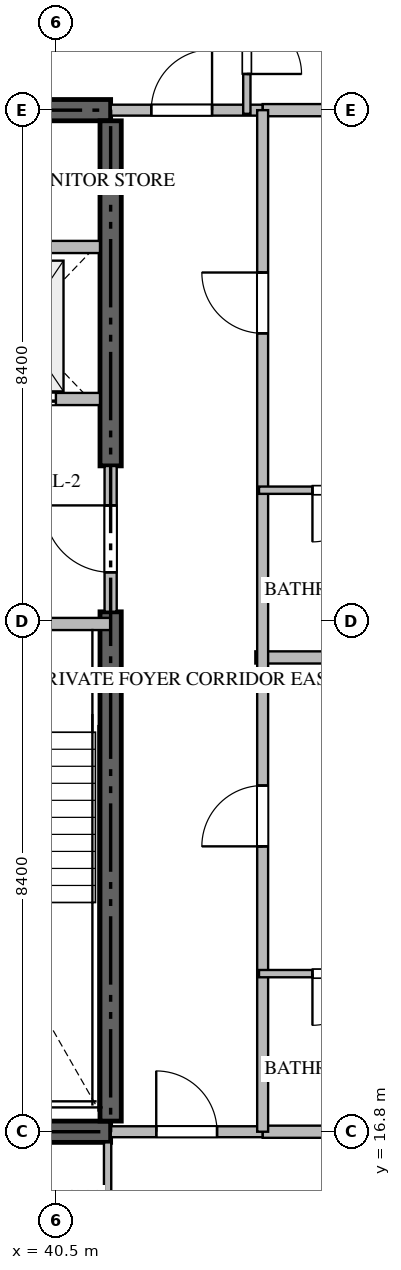
"""IFC4 building model, lengths in metres.
Left out: names, types, materials, properties, quantities, classifications, styles, units other than length and angle.
Written with IfcOpenShell. Run it as: python <this file> out.ifc"""

import sys

from ifc_helpers import new_model, si_unit, direction, frame, frame_2d, origin, place, context, subcontext, project, spatial, rectangle, extrude, source, transform, mapped, element, fill, save


model = new_model("IFC4")
c1 = context("Model", 3, precision=1e-05, world=origin(), true_north=direction((0.0, 1.0)))
c2 = subcontext(c1, "Body", "Model", "MODEL_VIEW")
j1 = project(units=[si_unit("LENGTHUNIT", "METRE"), si_unit("PLANEANGLEUNIT", "RADIAN")], contexts=[c1])
p1 = place(None, origin())
s1 = spatial("IfcSite", under=j1, at=p1, CompositionType="ELEMENT")
p2 = place(p1, origin())
s2 = spatial("IfcBuilding", under=s1, at=p2, CompositionType="ELEMENT")
p3 = place(p2, frame((0.0, 0.0, 237.4)))
s3 = spatial("IfcBuildingStorey", under=s2, at=p3, CompositionType="ELEMENT", Elevation=237.4)
for number, where, z_axis, x_axis in (
    (1, (23.4, 16.8, -0.26), (0.0, 0.0, 1.0), (1.0, 0.0, 0.0)),
    (2, (41.4, 33.6, -0.26), (0.0, 0.0, 1.0), (-1.0, 0.0, 0.0)),
):
    element("IfcWall", number, at=place(p3, frame(where, z_axis=z_axis, x_axis=x_axis)), inside=s3, PredefinedType="SHEAR", context=c2, shape_type="SweptSolid", body=[
        extrude(rectangle(XDim=18.0, YDim=0.35, at=frame_2d((9.0, 0.0))), origin(), (0.0, 0.0, 1.0), 3.848),
    ])
p4 = place(p3, frame((41.4, 16.975, -0.26), z_axis=(0.0, 0.0, 1.0), x_axis=(0.0, 1.0, 0.0)))
e3 = element("IfcWall", 3, at=p4, inside=s3, PredefinedType="SHEAR", context=c2, shape_type="SweptSolid", body=[
    extrude(rectangle(XDim=8.375, YDim=0.35, at=frame_2d((4.188, 0.0))), origin(), (0.0, 0.0, 1.0), 3.848),
])
p5 = place(p3, frame((41.4, 27.75, -0.26), z_axis=(0.0, 0.0, 1.0), x_axis=(0.0, 1.0, 0.0)))
e4 = element("IfcWall", 4, at=p5, inside=s3, PredefinedType="SHEAR", context=c2, shape_type="SweptSolid", body=[
    extrude(rectangle(XDim=5.675, YDim=0.35, at=frame_2d((2.837, 0.0))), origin(), (0.0, 0.0, 1.0), 3.848),
])
p6 = place(p3, frame((36.95, 25.15, 0.0), z_axis=(0.0, 0.0, 1.0), x_axis=(1.0, 0.0, 0.0)))
e5 = element("IfcWall", 5, at=p6, inside=s3, PredefinedType="STANDARD", context=c2, shape_type="SweptSolid", body=[
    extrude(rectangle(XDim=4.45, YDim=0.2, at=frame_2d((2.225, 0.0))), origin(), (0.0, 0.0, 1.0), 3.59),
])
p7 = place(p6, frame((1.65, 0.0, 0.0)))
e6 = element("IfcOpeningElement", 6, at=p7, cuts=e5, PredefinedType="OPENING", context=c2, shape_type="SweptSolid", body=[
    extrude(rectangle(XDim=1.1, YDim=2.15, at=frame_2d((0.55, 1.075))), frame((0.0, 0.11, 0.0), z_axis=(0.0, -1.0, 0.0), x_axis=(1.0, 0.0, 0.0)), (0.0, 0.0, 1.0), 0.22),
])
p8 = place(p3, frame((38.75, 28.85, 0.0), z_axis=(0.0, 0.0, 1.0), x_axis=(1.0, 0.0, 0.0)))
e7 = element("IfcWall", 7, at=p8, inside=s3, PredefinedType="STANDARD", context=c2, shape_type="SweptSolid", body=[
    extrude(rectangle(XDim=2.475, YDim=0.2, at=frame_2d((1.238, 0.0))), origin(), (0.0, 0.0, 1.0), 3.59),
])
p9 = place(p8, frame((0.55, 0.0, 0.0)))
e8 = element("IfcOpeningElement", 8, at=p9, cuts=e7, PredefinedType="OPENING", context=c2, shape_type="SweptSolid", body=[
    extrude(rectangle(XDim=1.2, YDim=2.2, at=frame_2d((0.6, 1.1))), frame((0.0, 0.11, 0.0), z_axis=(0.0, -1.0, 0.0), x_axis=(1.0, 0.0, 0.0)), (0.0, 0.0, 1.0), 0.22),
])
p10 = place(p3, frame((38.75, 31.35, 0.0), z_axis=(0.0, 0.0, 1.0), x_axis=(1.0, 0.0, 0.0)))
e9 = element("IfcWall", 9, at=p10, inside=s3, PredefinedType="STANDARD", context=c2, shape_type="SweptSolid", body=[
    extrude(rectangle(XDim=2.475, YDim=0.2, at=frame_2d((1.238, 0.0))), origin(), (0.0, 0.0, 1.0), 3.59),
])
p11 = place(p3, frame((41.4, 25.352, 0.0), z_axis=(0.0, 0.0, 1.0), x_axis=(0.0, 1.0, 0.0)))
e10 = element("IfcWall", 10, at=p11, inside=s3, PredefinedType="STANDARD", context=c2, shape_type="SweptSolid", body=[
    extrude(rectangle(XDim=2.396, YDim=0.2, at=frame_2d((1.198, 0.0))), origin(), (0.0, 0.0, 1.0), 3.59),
])
p12 = place(p11, frame((0.648, 0.0, 0.0)))
e11 = element("IfcOpeningElement", 11, at=p12, cuts=e10, PredefinedType="OPENING", context=c2, shape_type="SweptSolid", body=[
    extrude(rectangle(XDim=1.1, YDim=2.15, at=frame_2d((0.55, 1.075))), frame((0.0, 0.11, 0.0), z_axis=(0.0, -1.0, 0.0), x_axis=(1.0, 0.0, 0.0)), (0.0, 0.0, 1.0), 0.22),
])
p13 = place(p3, frame((43.78, 24.6, 0.0), z_axis=(0.0, 0.0, 1.0), x_axis=(1.0, 0.0, 0.0)))
e12 = element("IfcWall", 12, at=p13, inside=s3, PredefinedType="PARTITIONING", context=c2, shape_type="SweptSolid", body=[
    extrude(rectangle(XDim=13.538, YDim=0.2, at=frame_2d((6.769, 0.0))), origin(), (0.0, 0.0, 1.0), 3.59),
])
for number, where, z_axis, x_axis in (
    (13, (43.9, 16.8, 0.0), (0.0, 0.0, 1.0), (1.0, 0.0, 0.0)),
    (14, (43.9, 33.6, 0.0), (0.0, 0.0, 1.0), (1.0, 0.0, 0.0)),
):
    element("IfcWall", number, at=place(p3, frame(where, z_axis=z_axis, x_axis=x_axis)), inside=s3, PredefinedType="PARTITIONING", context=c2, shape_type="SweptSolid", body=[
        extrude(rectangle(XDim=13.418, YDim=0.2, at=frame_2d((6.709, 0.0))), origin(), (0.0, 0.0, 1.0), 3.59),
    ])
p14 = place(p3, frame((41.402, 16.8, 0.0), z_axis=(0.0, 0.0, 1.0), x_axis=(1.0, 0.0, 0.0)))
e15 = element("IfcWall", 15, at=p14, inside=s3, PredefinedType="PARTITIONING", context=c2, shape_type="SweptSolid", body=[
    extrude(rectangle(XDim=2.496, YDim=0.18, at=frame_2d((1.248, 0.0))), origin(), (0.0, 0.0, 1.0), 3.59),
])
p15 = place(p14, frame((0.748, 0.0, 0.0)))
e16 = element("IfcOpeningElement", 16, at=p15, cuts=e15, PredefinedType="OPENING", context=c2, shape_type="SweptSolid", body=[
    extrude(rectangle(XDim=1.0, YDim=2.15, at=frame_2d((0.5, 1.075))), frame((0.0, 0.1, 0.0), z_axis=(0.0, -1.0, 0.0), x_axis=(1.0, 0.0, 0.0)), (0.0, 0.0, 1.0), 0.2),
])
p16 = place(p3, frame((41.402, 33.6, 0.0), z_axis=(0.0, 0.0, 1.0), x_axis=(1.0, 0.0, 0.0)))
e17 = element("IfcWall", 17, at=p16, inside=s3, PredefinedType="PARTITIONING", context=c2, shape_type="SweptSolid", body=[
    extrude(rectangle(XDim=2.496, YDim=0.18, at=frame_2d((1.248, 0.0))), origin(), (0.0, 0.0, 1.0), 3.59),
])
p17 = place(p16, frame((0.666, 0.0, 0.0)))
e18 = element("IfcOpeningElement", 18, at=p17, cuts=e17, PredefinedType="OPENING", context=c2, shape_type="SweptSolid", body=[
    extrude(rectangle(XDim=1.0, YDim=2.15, at=frame_2d((0.5, 1.075))), frame((0.0, 0.1, 0.0), z_axis=(0.0, -1.0, 0.0), x_axis=(1.0, 0.0, 0.0)), (0.0, 0.0, 1.0), 0.2),
])
p18 = place(p3, frame((43.9, 16.8, 0.0), z_axis=(0.0, 0.0, 1.0), x_axis=(0.0, 1.0, 0.0)))
e19 = element("IfcWall", 19, at=p18, inside=s3, PredefinedType="PARTITIONING", context=c2, shape_type="SweptSolid", body=[
    extrude(rectangle(XDim=16.8, YDim=0.18, at=frame_2d((8.4, 0.0))), origin(), (0.0, 0.0, 1.0), 3.59),
])
p19 = place(p18, frame((4.693, 0.0, 0.0)))
e20 = element("IfcOpeningElement", 20, at=p19, cuts=e19, PredefinedType="OPENING", context=c2, shape_type="SweptSolid", body=[
    extrude(rectangle(XDim=1.0, YDim=2.15, at=frame_2d((0.5, 1.075))), frame((0.0, 0.1, 0.0), z_axis=(0.0, -1.0, 0.0), x_axis=(1.0, 0.0, 0.0)), (0.0, 0.0, 1.0), 0.2),
])
p20 = place(p18, frame((13.13, 0.0, 0.0)))
e21 = element("IfcOpeningElement", 21, at=p20, cuts=e19, PredefinedType="OPENING", context=c2, shape_type="SweptSolid", body=[
    extrude(rectangle(XDim=1.0, YDim=2.15, at=frame_2d((0.5, 1.075))), frame((0.0, 0.1, 0.0), z_axis=(0.0, -1.0, 0.0), x_axis=(1.0, 0.0, 0.0)), (0.0, 0.0, 1.0), 0.2),
])
p21 = place(p3, frame((41.35, 14.05, 0.0), z_axis=(0.0, 0.0, 1.0), x_axis=(0.0, 1.0, 0.0)))
e22 = element("IfcWall", 22, at=p21, inside=s3, PredefinedType="PARTITIONING", context=c2, shape_type="SweptSolid", body=[
    extrude(rectangle(XDim=2.575, YDim=0.12, at=frame_2d((1.288, 0.0))), origin(), (0.0, 0.0, 1.0), 3.59),
])
p22 = place(p3, frame((43.64, 35.75, 0.0), z_axis=(0.0, 0.0, 1.0), x_axis=(0.0, -1.0, 0.0)))
e23 = element("IfcWall", 23, at=p22, inside=s3, PredefinedType="PARTITIONING", context=c2, shape_type="SweptSolid", body=[
    extrude(rectangle(XDim=2.21, YDim=0.12, at=frame_2d((1.105, 0.0))), origin(), (0.0, 0.0, 1.0), 3.59),
])
p23 = place(p22, frame((0.655, 0.0, 0.0)))
e24 = element("IfcOpeningElement", 24, at=p23, cuts=e23, PredefinedType="OPENING", context=c2, shape_type="SweptSolid", body=[
    extrude(rectangle(XDim=0.9, YDim=2.1, at=frame_2d((0.45, 1.05))), frame((0.0, 0.07, 0.0), z_axis=(0.0, -1.0, 0.0), x_axis=(1.0, 0.0, 0.0)), (0.0, 0.0, 1.0), 0.14),
])
p24 = place(p3, frame((46.448, 19.4, 0.0), z_axis=(0.0, 0.0, 1.0), x_axis=(-1.0, 0.0, 0.0)))
e25 = element("IfcWall", 25, at=p24, inside=s3, PredefinedType="PARTITIONING", context=c2, shape_type="SweptSolid", body=[
    extrude(rectangle(XDim=2.608, YDim=0.12, at=frame_2d((1.304, 0.0))), origin(), (0.0, 0.0, 1.0), 3.59),
])
p25 = place(p24, frame((0.879, 0.0, 0.0)))
e26 = element("IfcOpeningElement", 26, at=p25, cuts=e25, PredefinedType="OPENING", context=c2, shape_type="SweptSolid", body=[
    extrude(rectangle(XDim=0.85, YDim=2.1, at=frame_2d((0.425, 1.05))), frame((0.0, 0.07, 0.0), z_axis=(0.0, -1.0, 0.0), x_axis=(1.0, 0.0, 0.0)), (0.0, 0.0, 1.0), 0.14),
])
p26 = place(p3, frame((46.448, 27.35, 0.0), z_axis=(0.0, 0.0, 1.0), x_axis=(-1.0, 0.0, 0.0)))
e27 = element("IfcWall", 27, at=p26, inside=s3, PredefinedType="PARTITIONING", context=c2, shape_type="SweptSolid", body=[
    extrude(rectangle(XDim=2.608, YDim=0.12, at=frame_2d((1.304, 0.0))), origin(), (0.0, 0.0, 1.0), 3.59),
])
p27 = place(p26, frame((0.879, 0.0, 0.0)))
e28 = element("IfcOpeningElement", 28, at=p27, cuts=e27, PredefinedType="OPENING", context=c2, shape_type="SweptSolid", body=[
    extrude(rectangle(XDim=0.85, YDim=2.1, at=frame_2d((0.425, 1.05))), frame((0.0, 0.07, 0.0), z_axis=(0.0, -1.0, 0.0), x_axis=(1.0, 0.0, 0.0)), (0.0, 0.0, 1.0), 0.14),
])
m1 = source(origin(), c2, "Body", "SweptSolid", [
    extrude(rectangle(XDim=1.2, YDim=2.2, at=frame_2d((0.6, 1.1))), frame((0.0, 0.025, 0.0), z_axis=(0.0, -1.0, 0.0), x_axis=(1.0, 0.0, 0.0)), (0.0, 0.0, 1.0), 0.05),
])
p28 = place(p9, origin())
e29 = element("IfcDoor", 29, at=p28, inside=s3, OperationType="DOUBLE_DOOR_SLIDING", PredefinedType="DOOR", context=c2, shape_type="MappedRepresentation", body=[
    mapped(m1, transform((0.0, 0.0, 0.0), scale=1.0)),
])
fill(e8, e29)
m2 = source(origin(), c2, "Body", "SweptSolid", [
    extrude(rectangle(XDim=1.1, YDim=2.15, at=frame_2d((0.55, 1.075))), frame((0.0, 0.025, 0.0), z_axis=(0.0, -1.0, 0.0), x_axis=(1.0, 0.0, 0.0)), (0.0, 0.0, 1.0), 0.05),
])
p29 = place(p12, origin())
e30 = element("IfcDoor", 30, at=p29, inside=s3, OperationType="SINGLE_SWING_RIGHT", PredefinedType="DOOR", context=c2, shape_type="MappedRepresentation", body=[
    mapped(m2, transform((0.0, 0.0, 0.0), scale=1.0)),
])
fill(e11, e30)
m3 = source(origin(), c2, "Body", "SweptSolid", [
    extrude(rectangle(XDim=1.0, YDim=2.15, at=frame_2d((0.5, 1.075))), frame((0.0, 0.025, 0.0), z_axis=(0.0, -1.0, 0.0), x_axis=(1.0, 0.0, 0.0)), (0.0, 0.0, 1.0), 0.05),
])
p30 = place(p15, origin())
e31 = element("IfcDoor", 31, at=p30, inside=s3, OperationType="SINGLE_SWING_LEFT", PredefinedType="DOOR", context=c2, shape_type="MappedRepresentation", body=[
    mapped(m3, transform((0.0, 0.0, 0.0), scale=1.0)),
])
fill(e16, e31)
p31 = place(p17, origin())
e32 = element("IfcDoor", 32, at=p31, inside=s3, OperationType="SINGLE_SWING_RIGHT", PredefinedType="DOOR", context=c2, shape_type="MappedRepresentation", body=[
    mapped(m3, transform((0.0, 0.0, 0.0), scale=1.0)),
])
fill(e18, e32)
p32 = place(p19, origin())
e33 = element("IfcDoor", 33, at=p32, inside=s3, OperationType="SINGLE_SWING_LEFT", PredefinedType="DOOR", context=c2, shape_type="MappedRepresentation", body=[
    mapped(m3, transform((0.0, 0.0, 0.0), scale=1.0)),
])
fill(e20, e33)
p33 = place(p20, origin())
e34 = element("IfcDoor", 34, at=p33, inside=s3, OperationType="SINGLE_SWING_RIGHT", PredefinedType="DOOR", context=c2, shape_type="MappedRepresentation", body=[
    mapped(m3, transform((0.0, 0.0, 0.0), scale=1.0)),
])
fill(e21, e34)
m4 = source(origin(), c2, "Body", "SweptSolid", [
    extrude(rectangle(XDim=0.9, YDim=2.1, at=frame_2d((0.45, 1.05))), frame((0.0, 0.025, 0.0), z_axis=(0.0, -1.0, 0.0), x_axis=(1.0, 0.0, 0.0)), (0.0, 0.0, 1.0), 0.05),
])
p34 = place(p23, origin())
e35 = element("IfcDoor", 35, at=p34, inside=s3, OperationType="SINGLE_SWING_RIGHT", PredefinedType="DOOR", context=c2, shape_type="MappedRepresentation", body=[
    mapped(m4, transform((0.0, 0.0, 0.0), scale=1.0)),
])
fill(e24, e35)
m5 = source(origin(), c2, "Body", "SweptSolid", [
    extrude(rectangle(XDim=0.85, YDim=2.1, at=frame_2d((0.425, 1.05))), frame((0.0, 0.025, 0.0), z_axis=(0.0, -1.0, 0.0), x_axis=(1.0, 0.0, 0.0)), (0.0, 0.0, 1.0), 0.05),
])
p35 = place(p25, origin())
e36 = element("IfcDoor", 36, at=p35, inside=s3, OperationType="SINGLE_SWING_RIGHT", PredefinedType="DOOR", context=c2, shape_type="MappedRepresentation", body=[
    mapped(m5, transform((0.0, 0.0, 0.0), scale=1.0)),
])
fill(e26, e36)
p36 = place(p27, origin())
e37 = element("IfcDoor", 37, at=p36, inside=s3, OperationType="SINGLE_SWING_RIGHT", PredefinedType="DOOR", context=c2, shape_type="MappedRepresentation", body=[
    mapped(m5, transform((0.0, 0.0, 0.0), scale=1.0)),
])
fill(e28, e37)
save(model, sys.argv[1])
